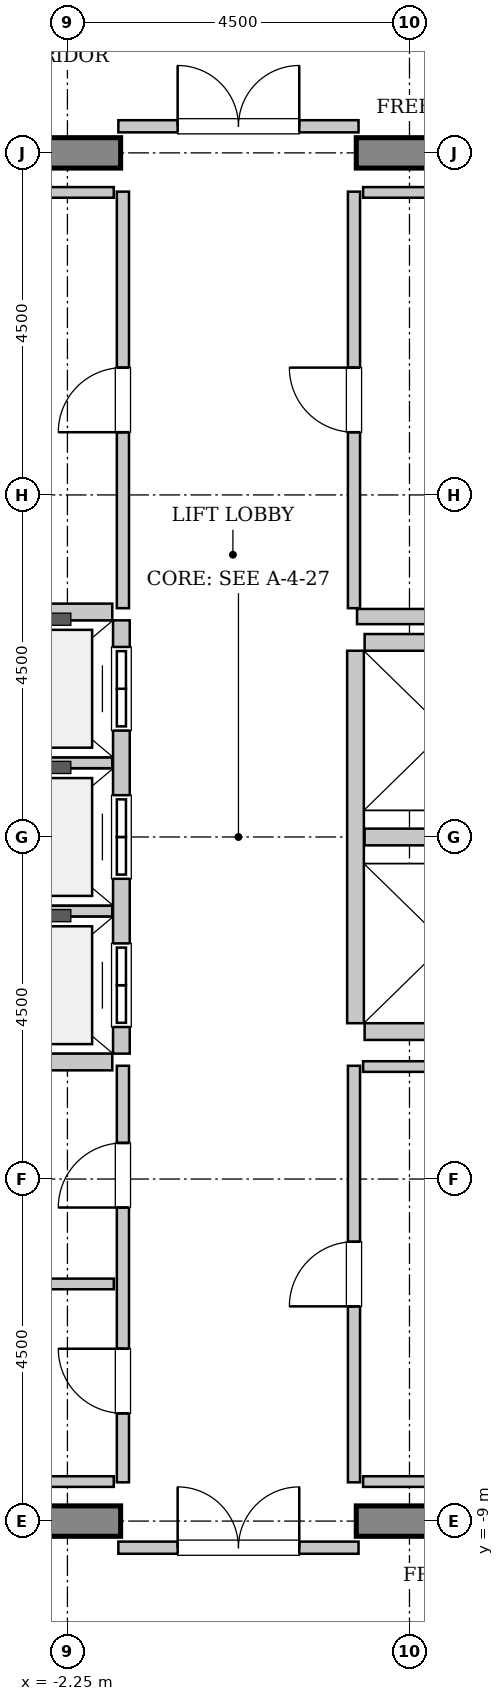
"""IFC4 building model, lengths in metres.
Left out: names, types, materials, properties, quantities, classifications, styles, units other than length and angle.
Written with IfcOpenShell. Run it as: python <this file> out.ifc"""

import sys

from ifc_helpers import new_model, si_unit, direction, frame, frame_2d, origin, place, context, subcontext, project, spatial, rectangle, extrude, source, transform, mapped, element, fill, save


model = new_model("IFC4")
c1 = context("Model", 3, precision=1e-05, world=origin(), true_north=direction((0.0, 1.0)))
c2 = subcontext(c1, "Body", "Model", "MODEL_VIEW")
j1 = project(units=[si_unit("LENGTHUNIT", "METRE"), si_unit("PLANEANGLEUNIT", "RADIAN")], contexts=[c1])
p1 = place(None, origin())
s1 = spatial("IfcSite", under=j1, at=p1, CompositionType="ELEMENT")
p2 = place(p1, origin())
s2 = spatial("IfcBuilding", under=s1, at=p2, CompositionType="ELEMENT")
p3 = place(p2, frame((0.0, 0.0, 341.4)))
s3 = spatial("IfcBuildingStorey", under=s2, at=p3, CompositionType="ELEMENT", Elevation=341.4)
m1 = source(origin(), c2, "Body", "SweptSolid", [
    extrude(rectangle(XDim=9.9, YDim=0.4, at=frame_2d((4.95, 0.0))), origin(), (0.0, 0.0, 1.0), 3.8),
])
for number, where, z_axis, x_axis in (
    (1, (-11.45, 9.0, 0.0), (0.0, 0.0, 1.0), (1.0, 0.0, 0.0)),
    (2, (1.55, 9.0, 0.0), (0.0, 0.0, 1.0), (1.0, 0.0, 0.0)),
    (3, (-11.45, -9.0, 0.0), (0.0, 0.0, 1.0), (1.0, 0.0, 0.0)),
    (4, (1.55, -9.0, 0.0), (0.0, 0.0, 1.0), (1.0, 0.0, 0.0)),
):
    element("IfcWall", number, at=place(p3, frame(where, z_axis=z_axis, x_axis=x_axis)), inside=s3, PredefinedType="SHEAR", context=c2, shape_type="MappedRepresentation", body=[
        mapped(m1, transform((0.0, 0.0, 0.0), x_axis=(1.0, 0.0, 0.0), y_axis=(0.0, 1.0, 0.0), z_axis=(0.0, 0.0, 1.0), scale=1.0)),
    ])
m2 = source(origin(), c2, "Body", "SweptSolid", [
    extrude(rectangle(XDim=5.7, YDim=0.22, at=frame_2d((2.85, 0.0))), origin(), (0.0, 0.0, 1.0), 3.535),
])
p4 = place(p3, frame((-1.54, -2.85, 0.0), z_axis=(0.0, 0.0, 1.0), x_axis=(0.0, 1.0, 0.0)))
e5 = element("IfcWall", 5, at=p4, inside=s3, PredefinedType="SOLIDWALL", context=c2, shape_type="MappedRepresentation", body=[
    mapped(m2, transform((0.0, 0.0, 0.0), x_axis=(1.0, 0.0, 0.0), y_axis=(0.0, 1.0, 0.0), z_axis=(0.0, 0.0, 1.0), scale=1.0)),
])
p5 = place(p4, frame((0.35, 0.0, 0.0)))
e6 = element("IfcOpeningElement", 6, at=p5, cuts=e5, PredefinedType="OPENING", context=c2, shape_type="SweptSolid", body=[
    extrude(rectangle(XDim=1.1, YDim=2.2, at=frame_2d((0.55, 1.1))), frame((0.0, 0.12, 0.0), z_axis=(0.0, -1.0, 0.0), x_axis=(1.0, 0.0, 0.0)), (0.0, 0.0, 1.0), 0.24),
])
p6 = place(p4, frame((2.3, 0.0, 0.0)))
e7 = element("IfcOpeningElement", 7, at=p6, cuts=e5, PredefinedType="OPENING", context=c2, shape_type="SweptSolid", body=[
    extrude(rectangle(XDim=1.1, YDim=2.2, at=frame_2d((0.55, 1.1))), frame((0.0, 0.12, 0.0), z_axis=(0.0, -1.0, 0.0), x_axis=(1.0, 0.0, 0.0)), (0.0, 0.0, 1.0), 0.24),
])
p7 = place(p4, frame((4.25, 0.0, 0.0)))
e8 = element("IfcOpeningElement", 8, at=p7, cuts=e5, PredefinedType="OPENING", context=c2, shape_type="SweptSolid", body=[
    extrude(rectangle(XDim=1.1, YDim=2.2, at=frame_2d((0.55, 1.1))), frame((0.0, 0.12, 0.0), z_axis=(0.0, -1.0, 0.0), x_axis=(1.0, 0.0, 0.0)), (0.0, 0.0, 1.0), 0.24),
])
m3 = source(origin(), c2, "Body", "SweptSolid", [
    extrude(rectangle(XDim=2.13, YDim=0.22, at=frame_2d((1.065, 0.0))), origin(), (0.0, 0.0, 1.0), 3.535),
])
p8 = place(p3, frame((-3.79, -2.96, 0.0), z_axis=(0.0, 0.0, 1.0), x_axis=(1.0, 0.0, 0.0)))
e9 = element("IfcWall", 9, at=p8, inside=s3, PredefinedType="SOLIDWALL", context=c2, shape_type="MappedRepresentation", body=[
    mapped(m3, transform((0.0, 0.0, 0.0), x_axis=(1.0, 0.0, 0.0), y_axis=(0.0, 1.0, 0.0), z_axis=(0.0, 0.0, 1.0), scale=1.0)),
])
m4 = source(origin(), c2, "Body", "SweptSolid", [
    extrude(rectangle(XDim=2.13, YDim=0.14, at=frame_2d((1.065, 0.0))), origin(), (0.0, 0.0, 1.0), 3.535),
])
for number, where, z_axis, x_axis in (
    (10, (-3.79, -0.975, 0.0), (0.0, 0.0, 1.0), (1.0, 0.0, 0.0)),
    (11, (-3.79, 0.975, 0.0), (0.0, 0.0, 1.0), (1.0, 0.0, 0.0)),
):
    element("IfcWall", number, at=place(p3, frame(where, z_axis=z_axis, x_axis=x_axis)), inside=s3, PredefinedType="PARTITIONING", context=c2, shape_type="MappedRepresentation", body=[
        mapped(m4, transform((0.0, 0.0, 0.0), x_axis=(1.0, 0.0, 0.0), y_axis=(0.0, 1.0, 0.0), z_axis=(0.0, 0.0, 1.0), scale=1.0)),
    ])
p9 = place(p3, frame((-1.66, 2.96, 0.0), z_axis=(0.0, 0.0, 1.0), x_axis=(-1.0, 0.0, 0.0)))
e12 = element("IfcWall", 12, at=p9, inside=s3, PredefinedType="SOLIDWALL", context=c2, shape_type="MappedRepresentation", body=[
    mapped(m3, transform((0.0, 0.0, 0.0), x_axis=(1.0, 0.0, 0.0), y_axis=(0.0, 1.0, 0.0), z_axis=(0.0, 0.0, 1.0), scale=1.0)),
])
m5 = source(origin(), c2, "Body", "SweptSolid", [
    extrude(rectangle(XDim=4.9, YDim=0.22, at=frame_2d((2.45, 0.0))), origin(), (0.0, 0.0, 1.0), 3.535),
])
p10 = place(p3, frame((1.54, 2.45, 0.0), z_axis=(0.0, 0.0, 1.0), x_axis=(0.0, -1.0, 0.0)))
e13 = element("IfcWall", 13, at=p10, inside=s3, PredefinedType="SOLIDWALL", context=c2, shape_type="MappedRepresentation", body=[
    mapped(m5, transform((0.0, 0.0, 0.0), x_axis=(1.0, 0.0, 0.0), y_axis=(0.0, 1.0, 0.0), z_axis=(0.0, 0.0, 1.0), scale=1.0)),
])
for number, where, z_axis, x_axis in (
    (14, (1.66, -2.56, 0.0), (0.0, 0.0, 1.0), (1.0, 0.0, 0.0)),
    (15, (1.66, 0.0, 0.0), (0.0, 0.0, 1.0), (1.0, 0.0, 0.0)),
    (16, (3.79, 2.56, 0.0), (0.0, 0.0, 1.0), (-1.0, 0.0, 0.0)),
):
    element("IfcWall", number, at=place(p3, frame(where, z_axis=z_axis, x_axis=x_axis)), inside=s3, PredefinedType="SOLIDWALL", context=c2, shape_type="MappedRepresentation", body=[
        mapped(m3, transform((0.0, 0.0, 0.0), x_axis=(1.0, 0.0, 0.0), y_axis=(0.0, 1.0, 0.0), z_axis=(0.0, 0.0, 1.0), scale=1.0)),
    ])
m6 = source(origin(), c2, "Body", "SweptSolid", [
    extrude(rectangle(XDim=2.52, YDim=0.2, at=frame_2d((1.26, 0.0))), origin(), (0.0, 0.0, 1.0), 3.535),
])
p11 = place(p3, frame((1.56, 2.9, 0.0), z_axis=(0.0, 0.0, 1.0), x_axis=(1.0, 0.0, 0.0)))
e17 = element("IfcWall", 17, at=p11, inside=s3, PredefinedType="PARTITIONING", context=c2, shape_type="MappedRepresentation", body=[
    mapped(m6, transform((0.0, 0.0, 0.0), x_axis=(1.0, 0.0, 0.0), y_axis=(0.0, 1.0, 0.0), z_axis=(0.0, 0.0, 1.0), scale=1.0)),
])
m7 = source(origin(), c2, "Body", "SweptSolid", [
    extrude(rectangle(XDim=3.16, YDim=0.16, at=frame_2d((1.58, 0.0))), origin(), (0.0, 0.0, 1.0), 2.625),
])
p12 = place(p3, frame((-1.58, 9.35, 0.0), z_axis=(0.0, 0.0, 1.0), x_axis=(1.0, 0.0, 0.0)))
e18 = element("IfcWall", 18, at=p12, inside=s3, PredefinedType="PARTITIONING", context=c2, shape_type="MappedRepresentation", body=[
    mapped(m7, transform((0.0, 0.0, 0.0), x_axis=(1.0, 0.0, 0.0), y_axis=(0.0, 1.0, 0.0), z_axis=(0.0, 0.0, 1.0), scale=1.0)),
])
p13 = place(p12, frame((0.78, 0.0, 0.0)))
e19 = element("IfcOpeningElement", 19, at=p13, cuts=e18, PredefinedType="OPENING", context=c2, shape_type="SweptSolid", body=[
    extrude(rectangle(XDim=1.6, YDim=2.3, at=frame_2d((0.8, 1.15))), frame((0.0, 0.09, 0.0), z_axis=(0.0, -1.0, 0.0), x_axis=(1.0, 0.0, 0.0)), (0.0, 0.0, 1.0), 0.18),
])
p14 = place(p3, frame((-1.58, -9.35, 0.0), z_axis=(0.0, 0.0, 1.0), x_axis=(1.0, 0.0, 0.0)))
e20 = element("IfcWall", 20, at=p14, inside=s3, PredefinedType="PARTITIONING", context=c2, shape_type="MappedRepresentation", body=[
    mapped(m7, transform((0.0, 0.0, 0.0), x_axis=(1.0, 0.0, 0.0), y_axis=(0.0, 1.0, 0.0), z_axis=(0.0, 0.0, 1.0), scale=1.0)),
])
p15 = place(p14, frame((0.78, 0.0, 0.0)))
e21 = element("IfcOpeningElement", 21, at=p15, cuts=e20, PredefinedType="OPENING", context=c2, shape_type="SweptSolid", body=[
    extrude(rectangle(XDim=1.6, YDim=2.3, at=frame_2d((0.8, 1.15))), frame((0.0, 0.09, 0.0), z_axis=(0.0, -1.0, 0.0), x_axis=(1.0, 0.0, 0.0)), (0.0, 0.0, 1.0), 0.18),
])
m8 = source(origin(), c2, "Body", "SweptSolid", [
    extrude(rectangle(XDim=5.48, YDim=0.16, at=frame_2d((2.74, 0.0))), origin(), (0.0, 0.0, 1.0), 3.535),
])
p16 = place(p3, frame((-1.52, 3.01, 0.0), z_axis=(0.0, 0.0, 1.0), x_axis=(0.0, 1.0, 0.0)))
e22 = element("IfcWall", 22, at=p16, inside=s3, PredefinedType="PARTITIONING", context=c2, shape_type="MappedRepresentation", body=[
    mapped(m8, transform((0.0, 0.0, 0.0), x_axis=(1.0, 0.0, 0.0), y_axis=(0.0, 1.0, 0.0), z_axis=(0.0, 0.0, 1.0), scale=1.0)),
])
p17 = place(p16, frame((2.315, 0.0, 0.0)))
e23 = element("IfcOpeningElement", 23, at=p17, cuts=e22, PredefinedType="OPENING", context=c2, shape_type="SweptSolid", body=[
    extrude(rectangle(XDim=0.85, YDim=2.1, at=frame_2d((0.425, 1.05))), frame((0.0, 0.09, 0.0), z_axis=(0.0, -1.0, 0.0), x_axis=(1.0, 0.0, 0.0)), (0.0, 0.0, 1.0), 0.18),
])
m9 = source(origin(), c2, "Body", "SweptSolid", [
    extrude(rectangle(XDim=3.15, YDim=0.14, at=frame_2d((1.575, 0.0))), origin(), (0.0, 0.0, 1.0), 3.535),
])
p18 = place(p3, frame((-4.79, 8.48, 0.0), z_axis=(0.0, 0.0, 1.0), x_axis=(1.0, 0.0, 0.0)))
e24 = element("IfcWall", 24, at=p18, inside=s3, PredefinedType="PARTITIONING", context=c2, shape_type="MappedRepresentation", body=[
    mapped(m9, transform((0.0, 0.0, 0.0), x_axis=(1.0, 0.0, 0.0), y_axis=(0.0, 1.0, 0.0), z_axis=(0.0, 0.0, 1.0), scale=1.0)),
])
p19 = place(p3, frame((-1.52, -8.49, 0.0), z_axis=(0.0, 0.0, 1.0), x_axis=(0.0, 1.0, 0.0)))
e25 = element("IfcWall", 25, at=p19, inside=s3, PredefinedType="PARTITIONING", context=c2, shape_type="MappedRepresentation", body=[
    mapped(m8, transform((0.0, 0.0, 0.0), x_axis=(1.0, 0.0, 0.0), y_axis=(0.0, 1.0, 0.0), z_axis=(0.0, 0.0, 1.0), scale=1.0)),
])
p20 = place(p19, frame((0.907, 0.0, 0.0)))
e26 = element("IfcOpeningElement", 26, at=p20, cuts=e25, PredefinedType="OPENING", context=c2, shape_type="SweptSolid", body=[
    extrude(rectangle(XDim=0.85, YDim=2.1, at=frame_2d((0.425, 1.05))), frame((0.0, 0.09, 0.0), z_axis=(0.0, -1.0, 0.0), x_axis=(1.0, 0.0, 0.0)), (0.0, 0.0, 1.0), 0.18),
])
p21 = place(p19, frame((3.615, 0.0, 0.0)))
e27 = element("IfcOpeningElement", 27, at=p21, cuts=e25, PredefinedType="OPENING", context=c2, shape_type="SweptSolid", body=[
    extrude(rectangle(XDim=0.85, YDim=2.1, at=frame_2d((0.425, 1.05))), frame((0.0, 0.09, 0.0), z_axis=(0.0, -1.0, 0.0), x_axis=(1.0, 0.0, 0.0)), (0.0, 0.0, 1.0), 0.18),
])
m10 = source(origin(), c2, "Body", "SweptSolid", [
    extrude(rectangle(XDim=5.55, YDim=0.14, at=frame_2d((2.775, 0.0))), origin(), (0.0, 0.0, 1.0), 3.535),
])
p22 = place(p3, frame((-7.19, -5.88, 0.0), z_axis=(0.0, 0.0, 1.0), x_axis=(1.0, 0.0, 0.0)))
e28 = element("IfcWall", 28, at=p22, inside=s3, PredefinedType="PARTITIONING", context=c2, shape_type="MappedRepresentation", body=[
    mapped(m10, transform((0.0, 0.0, 0.0), x_axis=(1.0, 0.0, 0.0), y_axis=(0.0, 1.0, 0.0), z_axis=(0.0, 0.0, 1.0), scale=1.0)),
])
p23 = place(p3, frame((1.52, 3.01, 0.0), z_axis=(0.0, 0.0, 1.0), x_axis=(0.0, 1.0, 0.0)))
e29 = element("IfcWall", 29, at=p23, inside=s3, PredefinedType="PARTITIONING", context=c2, shape_type="MappedRepresentation", body=[
    mapped(m8, transform((0.0, 0.0, 0.0), x_axis=(1.0, 0.0, 0.0), y_axis=(0.0, 1.0, 0.0), z_axis=(0.0, 0.0, 1.0), scale=1.0)),
])
p24 = place(p23, frame((2.315, 0.0, 0.0)))
e30 = element("IfcOpeningElement", 30, at=p24, cuts=e29, PredefinedType="OPENING", context=c2, shape_type="SweptSolid", body=[
    extrude(rectangle(XDim=0.85, YDim=2.1, at=frame_2d((0.425, 1.05))), frame((0.0, 0.09, 0.0), z_axis=(0.0, -1.0, 0.0), x_axis=(1.0, 0.0, 0.0)), (0.0, 0.0, 1.0), 0.18),
])
for number, where, z_axis, x_axis in (
    (31, (1.64, 8.48, 0.0), (0.0, 0.0, 1.0), (1.0, 0.0, 0.0)),
    (32, (-4.79, -8.48, 0.0), (0.0, 0.0, 1.0), (1.0, 0.0, 0.0)),
):
    element("IfcWall", number, at=place(p3, frame(where, z_axis=z_axis, x_axis=x_axis)), inside=s3, PredefinedType="PARTITIONING", context=c2, shape_type="MappedRepresentation", body=[
        mapped(m9, transform((0.0, 0.0, 0.0), x_axis=(1.0, 0.0, 0.0), y_axis=(0.0, 1.0, 0.0), z_axis=(0.0, 0.0, 1.0), scale=1.0)),
    ])
p25 = place(p3, frame((1.52, -8.49, 0.0), z_axis=(0.0, 0.0, 1.0), x_axis=(0.0, 1.0, 0.0)))
e33 = element("IfcWall", 33, at=p25, inside=s3, PredefinedType="PARTITIONING", context=c2, shape_type="MappedRepresentation", body=[
    mapped(m8, transform((0.0, 0.0, 0.0), x_axis=(1.0, 0.0, 0.0), y_axis=(0.0, 1.0, 0.0), z_axis=(0.0, 0.0, 1.0), scale=1.0)),
])
p26 = place(p25, frame((2.315, 0.0, 0.0)))
e34 = element("IfcOpeningElement", 34, at=p26, cuts=e33, PredefinedType="OPENING", context=c2, shape_type="SweptSolid", body=[
    extrude(rectangle(XDim=0.85, YDim=2.1, at=frame_2d((0.425, 1.05))), frame((0.0, 0.09, 0.0), z_axis=(0.0, -1.0, 0.0), x_axis=(1.0, 0.0, 0.0)), (0.0, 0.0, 1.0), 0.18),
])
for number, where, z_axis, x_axis in (
    (35, (1.64, -3.02, 0.0), (0.0, 0.0, 1.0), (1.0, 0.0, 0.0)),
    (36, (1.64, -8.48, 0.0), (0.0, 0.0, 1.0), (1.0, 0.0, 0.0)),
):
    element("IfcWall", number, at=place(p3, frame(where, z_axis=z_axis, x_axis=x_axis)), inside=s3, PredefinedType="PARTITIONING", context=c2, shape_type="MappedRepresentation", body=[
        mapped(m9, transform((0.0, 0.0, 0.0), x_axis=(1.0, 0.0, 0.0), y_axis=(0.0, 1.0, 0.0), z_axis=(0.0, 0.0, 1.0), scale=1.0)),
    ])
m11 = source(origin(), c2, "Body", "SweptSolid", [
    extrude(rectangle(XDim=1.1, YDim=2.2, at=frame_2d((0.55, 1.1))), frame((0.0, 0.025, 0.0), z_axis=(0.0, -1.0, 0.0), x_axis=(1.0, 0.0, 0.0)), (0.0, 0.0, 1.0), 0.05),
])
p27 = place(p5, origin())
e37 = element("IfcDoor", 37, at=p27, inside=s3, OperationType="DOUBLE_DOOR_SLIDING", PredefinedType="DOOR", context=c2, shape_type="MappedRepresentation", body=[
    mapped(m11, transform((0.0, 0.0, 0.0), x_axis=(1.0, 0.0, 0.0), y_axis=(0.0, 1.0, 0.0), z_axis=(0.0, 0.0, 1.0), scale=1.0)),
])
fill(e6, e37)
p28 = place(p6, origin())
e38 = element("IfcDoor", 38, at=p28, inside=s3, OperationType="DOUBLE_DOOR_SLIDING", PredefinedType="DOOR", context=c2, shape_type="MappedRepresentation", body=[
    mapped(m11, transform((0.0, 0.0, 0.0), x_axis=(1.0, 0.0, 0.0), y_axis=(0.0, 1.0, 0.0), z_axis=(0.0, 0.0, 1.0), scale=1.0)),
])
fill(e7, e38)
p29 = place(p7, origin())
e39 = element("IfcDoor", 39, at=p29, inside=s3, OperationType="DOUBLE_DOOR_SLIDING", PredefinedType="DOOR", context=c2, shape_type="MappedRepresentation", body=[
    mapped(m11, transform((0.0, 0.0, 0.0), x_axis=(1.0, 0.0, 0.0), y_axis=(0.0, 1.0, 0.0), z_axis=(0.0, 0.0, 1.0), scale=1.0)),
])
fill(e8, e39)
m12 = source(origin(), c2, "Body", "SweptSolid", [
    extrude(rectangle(XDim=1.6, YDim=2.3, at=frame_2d((0.8, 1.15))), frame((0.0, 0.025, 0.0), z_axis=(0.0, -1.0, 0.0), x_axis=(1.0, 0.0, 0.0)), (0.0, 0.0, 1.0), 0.05),
])
p30 = place(p13, origin())
e40 = element("IfcDoor", 40, at=p30, inside=s3, OperationType="DOUBLE_DOOR_SINGLE_SWING", PredefinedType="DOOR", context=c2, shape_type="MappedRepresentation", body=[
    mapped(m12, transform((0.0, 0.0, 0.0), x_axis=(1.0, 0.0, 0.0), y_axis=(0.0, 1.0, 0.0), z_axis=(0.0, 0.0, 1.0), scale=1.0)),
])
fill(e19, e40)
p31 = place(p15, origin())
e41 = element("IfcDoor", 41, at=p31, inside=s3, OperationType="DOUBLE_DOOR_SINGLE_SWING", PredefinedType="DOOR", context=c2, shape_type="MappedRepresentation", body=[
    mapped(m12, transform((0.0, 0.0, 0.0), x_axis=(1.0, 0.0, 0.0), y_axis=(0.0, 1.0, 0.0), z_axis=(0.0, 0.0, 1.0), scale=1.0)),
])
fill(e21, e41)
m13 = source(origin(), c2, "Body", "SweptSolid", [
    extrude(rectangle(XDim=0.85, YDim=2.1, at=frame_2d((0.425, 1.05))), frame((0.0, 0.025, 0.0), z_axis=(0.0, -1.0, 0.0), x_axis=(1.0, 0.0, 0.0)), (0.0, 0.0, 1.0), 0.05),
])
p32 = place(p17, origin())
e42 = element("IfcDoor", 42, at=p32, inside=s3, OperationType="SINGLE_SWING_LEFT", PredefinedType="DOOR", context=c2, shape_type="MappedRepresentation", body=[
    mapped(m13, transform((0.0, 0.0, 0.0), x_axis=(1.0, 0.0, 0.0), y_axis=(0.0, 1.0, 0.0), z_axis=(0.0, 0.0, 1.0), scale=1.0)),
])
fill(e23, e42)
p33 = place(p20, origin())
e43 = element("IfcDoor", 43, at=p33, inside=s3, OperationType="SINGLE_SWING_RIGHT", PredefinedType="DOOR", context=c2, shape_type="MappedRepresentation", body=[
    mapped(m13, transform((0.0, 0.0, 0.0), x_axis=(1.0, 0.0, 0.0), y_axis=(0.0, 1.0, 0.0), z_axis=(0.0, 0.0, 1.0), scale=1.0)),
])
fill(e26, e43)
p34 = place(p21, origin())
e44 = element("IfcDoor", 44, at=p34, inside=s3, OperationType="SINGLE_SWING_LEFT", PredefinedType="DOOR", context=c2, shape_type="MappedRepresentation", body=[
    mapped(m13, transform((0.0, 0.0, 0.0), x_axis=(1.0, 0.0, 0.0), y_axis=(0.0, 1.0, 0.0), z_axis=(0.0, 0.0, 1.0), scale=1.0)),
])
fill(e27, e44)
p35 = place(p24, origin())
e45 = element("IfcDoor", 45, at=p35, inside=s3, OperationType="SINGLE_SWING_RIGHT", PredefinedType="DOOR", context=c2, shape_type="MappedRepresentation", body=[
    mapped(m13, transform((0.0, 0.0, 0.0), x_axis=(1.0, 0.0, 0.0), y_axis=(0.0, 1.0, 0.0), z_axis=(0.0, 0.0, 1.0), scale=1.0)),
])
fill(e30, e45)
p36 = place(p26, origin())
e46 = element("IfcDoor", 46, at=p36, inside=s3, OperationType="SINGLE_SWING_LEFT", PredefinedType="DOOR", context=c2, shape_type="MappedRepresentation", body=[
    mapped(m13, transform((0.0, 0.0, 0.0), x_axis=(1.0, 0.0, 0.0), y_axis=(0.0, 1.0, 0.0), z_axis=(0.0, 0.0, 1.0), scale=1.0)),
])
fill(e34, e46)
save(model, sys.argv[1])
